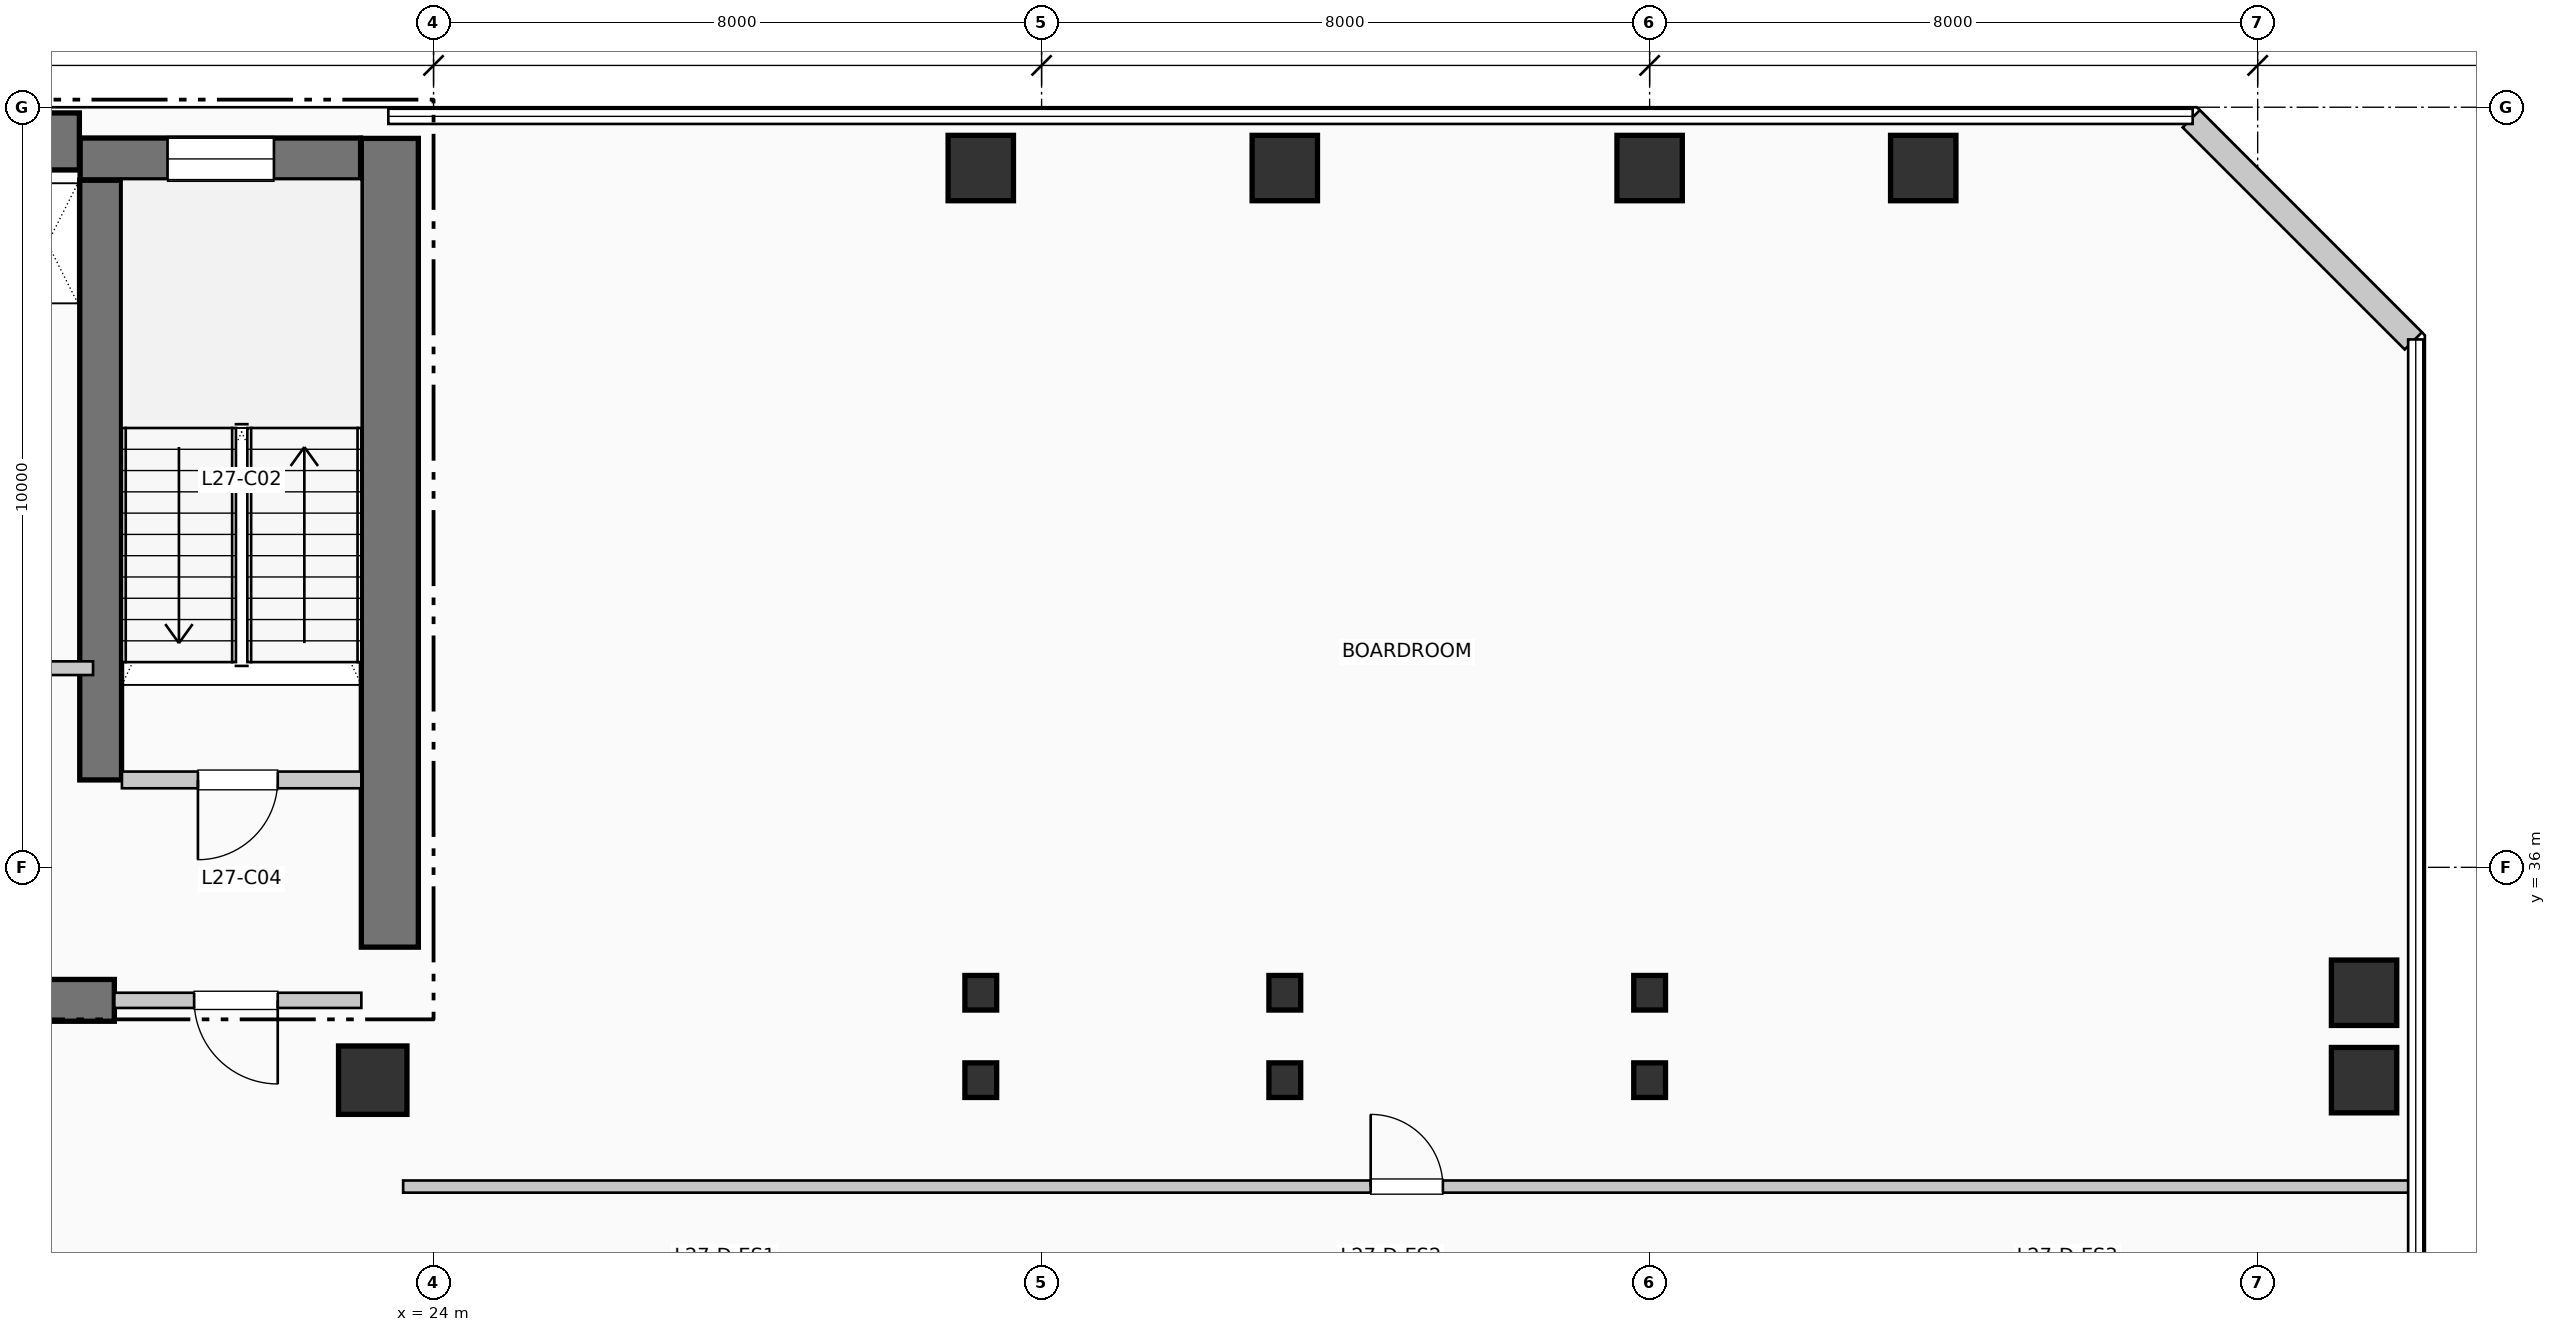
"""IFC4 building model, lengths in metres.
Left out: names, types, materials, properties, quantities, classifications, styles, units other than length and angle.
Written with IfcOpenShell. Run it as: python <this file> out.ifc"""

import sys

from ifc_helpers import new_model, si_unit, direction, frame, frame_2d, origin, origin_2d, place, context, subcontext, project, spatial, rectangle, i_section, extrude, element, fill, save


model = new_model("IFC4")
c1 = context("Model", 3, precision=1e-05, world=origin(), true_north=direction((0.0, 1.0)))
c2 = subcontext(c1, "Body", "Model", "MODEL_VIEW")
j1 = project(units=[si_unit("LENGTHUNIT", "METRE"), si_unit("PLANEANGLEUNIT", "RADIAN")], contexts=[c1])
p1 = place(None, origin())
s1 = spatial("IfcSite", under=j1, at=p1, CompositionType="ELEMENT")
p2 = place(p1, origin())
s2 = spatial("IfcBuilding", under=s1, at=p2, CompositionType="ELEMENT")
p3 = place(p2, frame((0.0, 0.0, 114.51)))
s3 = spatial("IfcBuildingStorey", under=s2, at=p3, CompositionType="ELEMENT", Elevation=114.51)
p4 = place(p3, frame((5.36, 45.55, 0.0), z_axis=(0.0, 0.0, 1.0), x_axis=(1.0, 0.0, 0.0)))
e1 = element("IfcWall", 1, at=p4, inside=s3, PredefinedType="SHEAR", context=c2, shape_type="SweptSolid", body=[
    extrude(rectangle(XDim=13.98, YDim=0.75, at=frame_2d((6.99, 0.0))), origin(), (0.0, 0.0, 1.0), 3.96),
])
p5 = place(p3, frame((23.425, 34.95, 0.0), z_axis=(0.0, 0.0, 1.0), x_axis=(0.0, 1.0, 0.0)))
e2 = element("IfcWall", 2, at=p5, inside=s3, PredefinedType="SHEAR", context=c2, shape_type="SweptSolid", body=[
    extrude(rectangle(XDim=10.64, YDim=0.75, at=frame_2d((5.32, 0.0))), origin(), (0.0, 0.0, 1.0), 3.96),
])
p6 = place(p3, frame((13.68, 34.25, 0.0), z_axis=(0.0, 0.0, 1.0), x_axis=(1.0, 0.0, 0.0)))
e3 = element("IfcWall", 3, at=p6, inside=s3, PredefinedType="SHEAR", context=c2, shape_type="SweptSolid", body=[
    extrude(rectangle(XDim=6.12, YDim=0.55, at=frame_2d((3.06, 0.0))), origin(), (0.0, 0.0, 1.0), 3.96),
])
p7 = place(p3, frame((19.62, 37.15, 0.0), z_axis=(0.0, 0.0, 1.0), x_axis=(0.0, 1.0, 0.0)))
e4 = element("IfcWall", 4, at=p7, inside=s3, PredefinedType="SHEAR", context=c2, shape_type="SweptSolid", body=[
    extrude(rectangle(XDim=7.89, YDim=0.55, at=frame_2d((3.945, 0.0))), origin(), (0.0, 0.0, 1.0), 3.96),
])
p8 = place(p3, frame((19.35, 45.32, 0.0), z_axis=(0.0, 0.0, 1.0), x_axis=(1.0, 0.0, 0.0)))
e5 = element("IfcWall", 5, at=p8, inside=s3, PredefinedType="SHEAR", context=c2, shape_type="SweptSolid", body=[
    extrude(rectangle(XDim=3.69, YDim=0.55, at=frame_2d((1.845, 0.0))), origin(), (0.0, 0.0, 1.0), 3.96),
])
p9 = place(p8, frame((1.15, 0.0, 1.05)))
e6 = element("IfcOpeningElement", 6, at=p9, cuts=e5, PredefinedType="OPENING", context=c2, shape_type="SweptSolid", body=[
    extrude(rectangle(XDim=1.4, YDim=1.8, at=frame_2d((0.7, 0.9))), frame((0.0, 0.285, 0.0), z_axis=(0.0, -1.0, 0.0), x_axis=(1.0, 0.0, 0.0)), (0.0, 0.0, 1.0), 0.57),
])
p10 = place(p3, frame((23.2, 33.2, 0.0), z_axis=(0.0, 0.0, 1.0), x_axis=(1.0, 0.0, 0.0)))
e7 = element("IfcColumn", 7, at=p10, inside=s3, PredefinedType="COLUMN", context=c2, shape_type="SweptSolid", body=[
    extrude(rectangle(XDim=0.9, YDim=0.9, at=origin_2d()), origin(), (0.0, 0.0, 1.0), 3.96),
])
for number, where, z_axis, x_axis in (
    (8, (31.2, 33.2, 0.0), (0.0, 0.0, 1.0), (1.0, 0.0, 0.0)),
    (9, (31.2, 34.35, 0.0), (0.0, 0.0, 1.0), (1.0, 0.0, 0.0)),
):
    element("IfcColumn", number, at=place(p3, frame(where, z_axis=z_axis, x_axis=x_axis)), inside=s3, PredefinedType="COLUMN", context=c2, shape_type="SweptSolid", body=[
        extrude(i_section(OverallWidth=0.418, OverallDepth=0.455, WebThickness=0.032, FlangeThickness=0.051, at=origin_2d()), origin(), (0.0, 0.0, 1.0), 3.96),
    ])
p11 = place(p3, frame((31.2, 45.2, 0.0), z_axis=(0.0, 0.0, 1.0), x_axis=(1.0, 0.0, 0.0)))
e10 = element("IfcColumn", 10, at=p11, inside=s3, PredefinedType="COLUMN", context=c2, shape_type="SweptSolid", body=[
    extrude(rectangle(XDim=0.86, YDim=0.86, at=origin_2d()), origin(), (0.0, 0.0, 1.0), 3.96),
])
for number, where, z_axis, x_axis in (
    (11, (35.2, 33.2, 0.0), (0.0, 0.0, 1.0), (1.0, 0.0, 0.0)),
    (12, (35.2, 34.35, 0.0), (0.0, 0.0, 1.0), (1.0, 0.0, 0.0)),
):
    element("IfcColumn", number, at=place(p3, frame(where, z_axis=z_axis, x_axis=x_axis)), inside=s3, PredefinedType="COLUMN", context=c2, shape_type="SweptSolid", body=[
        extrude(i_section(OverallWidth=0.418, OverallDepth=0.455, WebThickness=0.032, FlangeThickness=0.051, at=origin_2d()), origin(), (0.0, 0.0, 1.0), 3.96),
    ])
p12 = place(p3, frame((35.2, 45.2, 0.0), z_axis=(0.0, 0.0, 1.0), x_axis=(1.0, 0.0, 0.0)))
e13 = element("IfcColumn", 13, at=p12, inside=s3, PredefinedType="COLUMN", context=c2, shape_type="SweptSolid", body=[
    extrude(rectangle(XDim=0.86, YDim=0.86, at=origin_2d()), origin(), (0.0, 0.0, 1.0), 3.96),
])
for number, where, z_axis, x_axis in (
    (14, (40.0, 33.2, 0.0), (0.0, 0.0, 1.0), (1.0, 0.0, 0.0)),
    (15, (40.0, 34.35, 0.0), (0.0, 0.0, 1.0), (1.0, 0.0, 0.0)),
):
    element("IfcColumn", number, at=place(p3, frame(where, z_axis=z_axis, x_axis=x_axis)), inside=s3, PredefinedType="COLUMN", context=c2, shape_type="SweptSolid", body=[
        extrude(i_section(OverallWidth=0.418, OverallDepth=0.455, WebThickness=0.032, FlangeThickness=0.051, at=origin_2d()), origin(), (0.0, 0.0, 1.0), 3.96),
    ])
for number, where, z_axis, x_axis in (
    (16, (40.0, 45.2, 0.0), (0.0, 0.0, 1.0), (1.0, 0.0, 0.0)),
    (17, (43.6, 45.2, 0.0), (0.0, 0.0, 1.0), (1.0, 0.0, 0.0)),
    (18, (49.4, 33.2, 0.0), (0.0, 0.0, 1.0), (1.0, 0.0, 0.0)),
    (19, (49.4, 34.35, 0.0), (0.0, 0.0, 1.0), (1.0, 0.0, 0.0)),
):
    element("IfcColumn", number, at=place(p3, frame(where, z_axis=z_axis, x_axis=x_axis)), inside=s3, PredefinedType="COLUMN", context=c2, shape_type="SweptSolid", body=[
        extrude(rectangle(XDim=0.86, YDim=0.86, at=origin_2d()), origin(), (0.0, 0.0, 1.0), 3.96),
    ])
p13 = place(p3, frame((50.048, 42.926, 0.0), z_axis=(0.0, 0.0, 1.0), x_axis=(-0.707136318428, 0.707077242712, 0.0)))
e20 = element("IfcWall", 20, at=p13, inside=s3, PredefinedType="SOLIDWALL", context=c2, shape_type="SweptSolid", body=[
    extrude(rectangle(XDim=4.133, YDim=0.32, at=frame_2d((2.066, 0.0))), origin(), (0.0, 0.0, 1.0), 3.71),
])
p14 = place(p3, frame((19.9, 37.15, 0.0), z_axis=(0.0, 0.0, 1.0), x_axis=(1.0, 0.0, 0.0)))
e21 = element("IfcWall", 21, at=p14, inside=s3, PredefinedType="PARTITIONING", context=c2, shape_type="SweptSolid", body=[
    extrude(rectangle(XDim=3.15, YDim=0.22, at=frame_2d((1.575, 0.0))), origin(), (0.0, 0.0, 1.0), 3.71),
])
p15 = place(p14, frame((2.05, 0.0, 0.0), z_axis=(0.0, 0.0, 1.0), x_axis=(-1.0, 0.0, 0.0)))
e22 = element("IfcOpeningElement", 22, at=p15, cuts=e21, PredefinedType="OPENING", context=c2, shape_type="SweptSolid", body=[
    extrude(rectangle(XDim=1.05, YDim=2.15, at=frame_2d((0.525, 1.075))), frame((0.0, 0.12, 0.0), z_axis=(0.0, -1.0, 0.0), x_axis=(1.0, 0.0, 0.0)), (0.0, 0.0, 1.0), 0.24),
])
p16 = place(p3, frame((19.8, 34.25, 0.0), z_axis=(0.0, 0.0, 1.0), x_axis=(1.0, 0.0, 0.0)))
e23 = element("IfcWall", 23, at=p16, inside=s3, PredefinedType="PARTITIONING", context=c2, shape_type="SweptSolid", body=[
    extrude(rectangle(XDim=3.25, YDim=0.2, at=frame_2d((1.625, 0.0))), origin(), (0.0, 0.0, 1.0), 3.71),
])
p17 = place(p16, frame((2.15, 0.0, 0.0), z_axis=(0.0, 0.0, 1.0), x_axis=(-1.0, 0.0, 0.0)))
e24 = element("IfcOpeningElement", 24, at=p17, cuts=e23, PredefinedType="OPENING", context=c2, shape_type="SweptSolid", body=[
    extrude(rectangle(XDim=1.1, YDim=2.15, at=frame_2d((0.55, 1.075))), frame((0.0, 0.11, 0.0), z_axis=(0.0, -1.0, 0.0), x_axis=(1.0, 0.0, 0.0)), (0.0, 0.0, 1.0), 0.22),
])
p18 = place(p3, frame((17.68, 38.62, 0.0), z_axis=(0.0, 0.0, 1.0), x_axis=(1.0, 0.0, 0.0)))
e25 = element("IfcWall", 25, at=p18, inside=s3, PredefinedType="PARTITIONING", context=c2, shape_type="SweptSolid", body=[
    extrude(rectangle(XDim=1.84, YDim=0.18, at=frame_2d((0.92, 0.0))), origin(), (0.0, 0.0, 1.0), 3.71),
])
p19 = place(p18, frame((0.24, 0.0, 0.0)))
e26 = element("IfcOpeningElement", 26, at=p19, cuts=e25, PredefinedType="OPENING", context=c2, shape_type="SweptSolid", body=[
    extrude(rectangle(XDim=0.92, YDim=2.1, at=frame_2d((0.46, 1.05))), frame((0.0, 0.1, 0.0), z_axis=(0.0, -1.0, 0.0), x_axis=(1.0, 0.0, 0.0)), (0.0, 0.0, 1.0), 0.2),
])
p20 = place(p3, frame((23.6, 31.8, 0.0), z_axis=(0.0, 0.0, 1.0), x_axis=(1.0, 0.0, 0.0)))
e27 = element("IfcWall", 27, at=p20, inside=s3, PredefinedType="PARTITIONING", context=c2, shape_type="SweptSolid", body=[
    extrude(rectangle(XDim=26.41, YDim=0.16, at=frame_2d((13.205, 0.0))), origin(), (0.0, 0.0, 1.0), 3.71),
])
p21 = place(p20, frame((12.73, 0.0, 0.0)))
e28 = element("IfcOpeningElement", 28, at=p21, cuts=e27, PredefinedType="OPENING", context=c2, shape_type="SweptSolid", body=[
    extrude(rectangle(XDim=0.95, YDim=2.15, at=frame_2d((0.475, 1.075))), frame((0.0, 0.09, 0.0), z_axis=(0.0, -1.0, 0.0), x_axis=(1.0, 0.0, 0.0)), (0.0, 0.0, 1.0), 0.18),
])
p22 = place(p9, origin())
e29 = element("IfcWindow", 29, at=p22, inside=s3, PartitioningType="SINGLE_PANEL", PredefinedType="WINDOW", context=c2, shape_type="SweptSolid", body=[
    extrude(rectangle(XDim=1.4, YDim=1.8, at=frame_2d((0.7, 0.9))), frame((0.0, 0.03, 0.0), z_axis=(0.0, -1.0, 0.0), x_axis=(1.0, 0.0, 0.0)), (0.0, 0.0, 1.0), 0.06),
])
fill(e6, e29)
p23 = place(p15, origin())
e30 = element("IfcDoor", 30, at=p23, inside=s3, OperationType="SINGLE_SWING_LEFT", PredefinedType="DOOR", context=c2, shape_type="SweptSolid", body=[
    extrude(rectangle(XDim=1.05, YDim=2.15, at=frame_2d((0.525, 1.075))), frame((0.0, 0.025, 0.0), z_axis=(0.0, -1.0, 0.0), x_axis=(1.0, 0.0, 0.0)), (0.0, 0.0, 1.0), 0.05),
])
fill(e22, e30)
p24 = place(p17, origin())
e31 = element("IfcDoor", 31, at=p24, inside=s3, OperationType="SINGLE_SWING_RIGHT", PredefinedType="DOOR", context=c2, shape_type="SweptSolid", body=[
    extrude(rectangle(XDim=1.1, YDim=2.15, at=frame_2d((0.55, 1.075))), frame((0.0, 0.025, 0.0), z_axis=(0.0, -1.0, 0.0), x_axis=(1.0, 0.0, 0.0)), (0.0, 0.0, 1.0), 0.05),
])
fill(e24, e31)
p25 = place(p21, origin())
e32 = element("IfcDoor", 32, at=p25, inside=s3, OperationType="SINGLE_SWING_LEFT", PredefinedType="DOOR", context=c2, shape_type="SweptSolid", body=[
    extrude(rectangle(XDim=0.95, YDim=2.15, at=frame_2d((0.475, 1.075))), frame((0.0, 0.025, 0.0), z_axis=(0.0, -1.0, 0.0), x_axis=(1.0, 0.0, 0.0)), (0.0, 0.0, 1.0), 0.05),
])
fill(e28, e32)
save(model, sys.argv[1])
